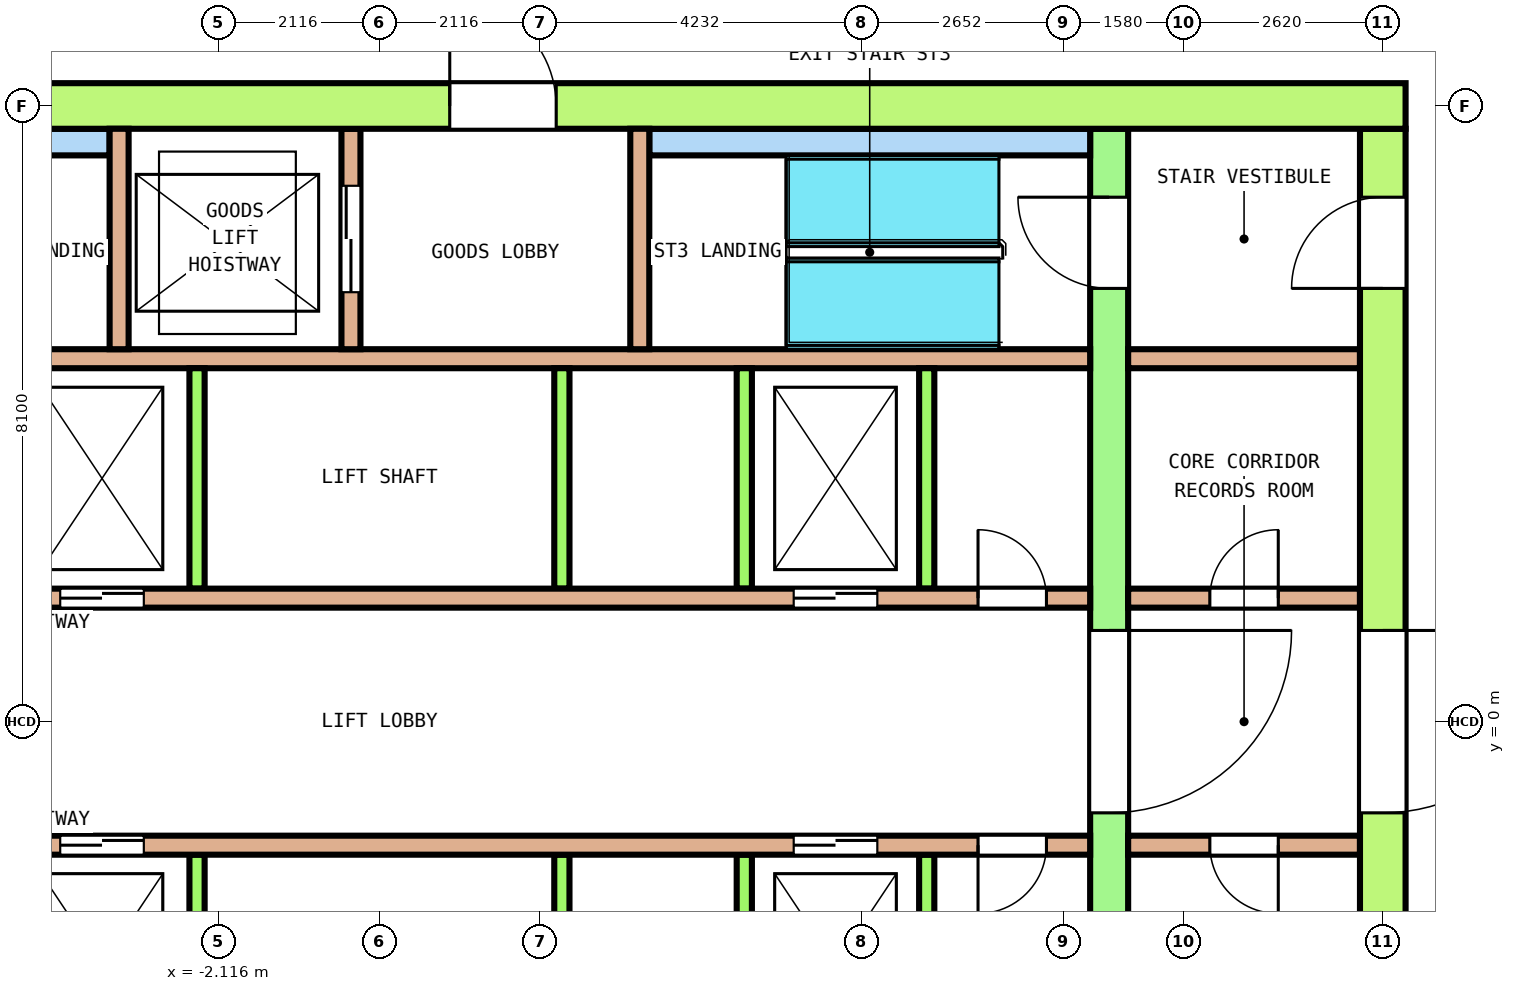
"""IFC4 building model, lengths in metres.
Left out: names, types, materials, properties, quantities, classifications, styles, units other than length and angle.
Written with IfcOpenShell. Run it as: python <this file> out.ifc"""

import sys

from ifc_helpers import new_model, si_unit, direction, frame, frame_2d, origin, place, context, subcontext, project, spatial, rectangle, extrude, element, fill, save


model = new_model("IFC4")
c1 = context("Model", 3, precision=1e-05, world=origin(), true_north=direction((0.0, 1.0)))
c2 = subcontext(c1, "Body", "Model", "MODEL_VIEW")
j1 = project(units=[si_unit("LENGTHUNIT", "METRE"), si_unit("PLANEANGLEUNIT", "RADIAN")], contexts=[c1])
p1 = place(None, origin())
s1 = spatial("IfcSite", under=j1, at=p1, CompositionType="ELEMENT")
p2 = place(p1, origin())
s2 = spatial("IfcBuilding", under=s1, at=p2, CompositionType="ELEMENT")
p3 = place(p2, frame((0.0, 0.0, 223.4)))
s3 = spatial("IfcBuildingStorey", under=s2, at=p3, CompositionType="ELEMENT", Elevation=223.4)
p4 = place(p3, frame((-13.5, 8.1, 0.0), z_axis=(0.0, 0.0, 1.0), x_axis=(1.0, 0.0, 0.0)))
e1 = element("IfcWall", 1, at=p4, inside=s3, PredefinedType="SHEAR", context=c2, shape_type="SweptSolid", body=[
    extrude(rectangle(XDim=27.0, YDim=0.6, at=frame_2d((13.5, 0.0))), origin(), (0.0, 0.0, 1.0), 3.7),
])
p5 = place(p4, frame((14.425, 0.0, 0.0)))
e2 = element("IfcOpeningElement", 2, at=p5, cuts=e1, PredefinedType="OPENING", context=c2, shape_type="SweptSolid", body=[
    extrude(rectangle(XDim=1.4, YDim=2.1, at=frame_2d((0.7, 1.05))), frame((0.0, 0.31, 0.0), z_axis=(0.0, -1.0, 0.0), x_axis=(1.0, 0.0, 0.0)), (0.0, 0.0, 1.0), 0.62),
])
p6 = place(p3, frame((13.2, -7.8, 0.0), z_axis=(0.0, 0.0, 1.0), x_axis=(0.0, 1.0, 0.0)))
e3 = element("IfcWall", 3, at=p6, inside=s3, PredefinedType="SHEAR", context=c2, shape_type="SweptSolid", body=[
    extrude(rectangle(XDim=15.6, YDim=0.6, at=frame_2d((7.8, 0.0))), origin(), (0.0, 0.0, 1.0), 3.7),
])
p7 = place(p6, frame((6.6, 0.0, 0.0)))
e4 = element("IfcOpeningElement", 4, at=p7, cuts=e3, PredefinedType="OPENING", context=c2, shape_type="SweptSolid", body=[
    extrude(rectangle(XDim=2.4, YDim=2.1, at=frame_2d((1.2, 1.05))), frame((0.0, 0.31, 0.0), z_axis=(0.0, -1.0, 0.0), x_axis=(1.0, 0.0, 0.0)), (0.0, 0.0, 1.0), 0.62),
])
p8 = place(p6, frame((13.5, 0.0, 0.0)))
e5 = element("IfcOpeningElement", 5, at=p8, cuts=e3, PredefinedType="OPENING", context=c2, shape_type="SweptSolid", body=[
    extrude(rectangle(XDim=1.2, YDim=2.1, at=frame_2d((0.6, 1.05))), frame((0.0, 0.31, 0.0), z_axis=(0.0, -1.0, 0.0), x_axis=(1.0, 0.0, 0.0)), (0.0, 0.0, 1.0), 0.62),
])
p9 = place(p6, frame((0.194, 0.0, 0.0)))
e6 = element("IfcOpeningElement", 6, at=p9, cuts=e3, PredefinedType="OPENING", context=c2, shape_type="SweptSolid", body=[
    extrude(rectangle(XDim=1.0, YDim=2.1, at=frame_2d((0.5, 1.05))), frame((0.0, 0.31, 0.0), z_axis=(0.0, -1.0, 0.0), x_axis=(1.0, 0.0, 0.0)), (0.0, 0.0, 1.0), 0.62),
])
p10 = place(p6, frame((1.706, 0.0, 0.0)))
e7 = element("IfcOpeningElement", 7, at=p10, cuts=e3, PredefinedType="OPENING", context=c2, shape_type="SweptSolid", body=[
    extrude(rectangle(XDim=1.0, YDim=2.1, at=frame_2d((0.5, 1.05))), frame((0.0, 0.31, 0.0), z_axis=(0.0, -1.0, 0.0), x_axis=(1.0, 0.0, 0.0)), (0.0, 0.0, 1.0), 0.62),
])
p11 = place(p3, frame((9.6, -7.8, 0.0), z_axis=(0.0, 0.0, 1.0), x_axis=(0.0, 1.0, 0.0)))
e8 = element("IfcWall", 8, at=p11, inside=s3, PredefinedType="SHEAR", context=c2, shape_type="SweptSolid", body=[
    extrude(rectangle(XDim=15.6, YDim=0.5, at=frame_2d((7.8, 0.0))), origin(), (0.0, 0.0, 1.0), 3.7),
])
p12 = place(p11, frame((6.6, 0.0, 0.0)))
e9 = element("IfcOpeningElement", 9, at=p12, cuts=e8, PredefinedType="OPENING", context=c2, shape_type="SweptSolid", body=[
    extrude(rectangle(XDim=2.4, YDim=2.1, at=frame_2d((1.2, 1.05))), frame((0.0, 0.26, 0.0), z_axis=(0.0, -1.0, 0.0), x_axis=(1.0, 0.0, 0.0)), (0.0, 0.0, 1.0), 0.52),
])
p13 = place(p11, frame((13.5, 0.0, 0.0)))
e10 = element("IfcOpeningElement", 10, at=p13, cuts=e8, PredefinedType="OPENING", context=c2, shape_type="SweptSolid", body=[
    extrude(rectangle(XDim=1.2, YDim=2.1, at=frame_2d((0.6, 1.05))), frame((0.0, 0.26, 0.0), z_axis=(0.0, -1.0, 0.0), x_axis=(1.0, 0.0, 0.0)), (0.0, 0.0, 1.0), 0.52),
])
p14 = place(p11, frame((1.0, 0.0, 0.0)))
e11 = element("IfcOpeningElement", 11, at=p14, cuts=e8, PredefinedType="OPENING", context=c2, shape_type="SweptSolid", body=[
    extrude(rectangle(XDim=1.0, YDim=2.1, at=frame_2d((0.5, 1.05))), frame((0.0, 0.26, 0.0), z_axis=(0.0, -1.0, 0.0), x_axis=(1.0, 0.0, 0.0)), (0.0, 0.0, 1.0), 0.52),
])
p15 = place(p3, frame((-9.35, 1.625, 0.0), z_axis=(0.0, 0.0, 1.0), x_axis=(1.0, 0.0, 0.0)))
e12 = element("IfcWall", 12, at=p15, inside=s3, PredefinedType="SOLIDWALL", context=c2, shape_type="SweptSolid", body=[
    extrude(rectangle(XDim=18.7, YDim=0.25, at=frame_2d((9.35, 0.0))), origin(), (0.0, 0.0, 1.0), 3.7),
])
p16 = place(p15, frame((2.85, 0.0, 0.0)))
e13 = element("IfcOpeningElement", 13, at=p16, cuts=e12, PredefinedType="OPENING", context=c2, shape_type="SweptSolid", body=[
    extrude(rectangle(XDim=1.1, YDim=2.1, at=frame_2d((0.55, 1.05))), frame((0.0, 0.135, 0.0), z_axis=(0.0, -1.0, 0.0), x_axis=(1.0, 0.0, 0.0)), (0.0, 0.0, 1.0), 0.27),
])
p17 = place(p15, frame((5.15, 0.0, 0.0)))
e14 = element("IfcOpeningElement", 14, at=p17, cuts=e12, PredefinedType="OPENING", context=c2, shape_type="SweptSolid", body=[
    extrude(rectangle(XDim=1.1, YDim=2.1, at=frame_2d((0.55, 1.05))), frame((0.0, 0.135, 0.0), z_axis=(0.0, -1.0, 0.0), x_axis=(1.0, 0.0, 0.0)), (0.0, 0.0, 1.0), 0.27),
])
p18 = place(p15, frame((14.8, 0.0, 0.0)))
e15 = element("IfcOpeningElement", 15, at=p18, cuts=e12, PredefinedType="OPENING", context=c2, shape_type="SweptSolid", body=[
    extrude(rectangle(XDim=1.1, YDim=2.1, at=frame_2d((0.55, 1.05))), frame((0.0, 0.135, 0.0), z_axis=(0.0, -1.0, 0.0), x_axis=(1.0, 0.0, 0.0)), (0.0, 0.0, 1.0), 0.27),
])
p19 = place(p15, frame((0.575, 0.0, 0.0)))
e16 = element("IfcOpeningElement", 16, at=p19, cuts=e12, PredefinedType="OPENING", context=c2, shape_type="SweptSolid", body=[
    extrude(rectangle(XDim=0.9, YDim=2.1, at=frame_2d((0.45, 1.05))), frame((0.0, 0.135, 0.0), z_axis=(0.0, -1.0, 0.0), x_axis=(1.0, 0.0, 0.0)), (0.0, 0.0, 1.0), 0.27),
])
p20 = place(p15, frame((17.225, 0.0, 0.0)))
e17 = element("IfcOpeningElement", 17, at=p20, cuts=e12, PredefinedType="OPENING", context=c2, shape_type="SweptSolid", body=[
    extrude(rectangle(XDim=0.9, YDim=2.1, at=frame_2d((0.45, 1.05))), frame((0.0, 0.135, 0.0), z_axis=(0.0, -1.0, 0.0), x_axis=(1.0, 0.0, 0.0)), (0.0, 0.0, 1.0), 0.27),
])
p21 = place(p3, frame((9.85, 1.625, 0.0), z_axis=(0.0, 0.0, 1.0), x_axis=(1.0, 0.0, 0.0)))
e18 = element("IfcWall", 18, at=p21, inside=s3, PredefinedType="SOLIDWALL", context=c2, shape_type="SweptSolid", body=[
    extrude(rectangle(XDim=3.05, YDim=0.25, at=frame_2d((1.525, 0.0))), origin(), (0.0, 0.0, 1.0), 3.7),
])
p22 = place(p21, frame((1.075, 0.0, 0.0)))
e19 = element("IfcOpeningElement", 19, at=p22, cuts=e18, PredefinedType="OPENING", context=c2, shape_type="SweptSolid", body=[
    extrude(rectangle(XDim=0.9, YDim=2.1, at=frame_2d((0.45, 1.05))), frame((0.0, 0.135, 0.0), z_axis=(0.0, -1.0, 0.0), x_axis=(1.0, 0.0, 0.0)), (0.0, 0.0, 1.0), 0.27),
])
p23 = place(p3, frame((-9.35, 4.775, 0.0), z_axis=(0.0, 0.0, 1.0), x_axis=(1.0, 0.0, 0.0)))
e20 = element("IfcWall", 20, at=p23, inside=s3, PredefinedType="SOLIDWALL", context=c2, shape_type="SweptSolid", body=[
    extrude(rectangle(XDim=18.7, YDim=0.25, at=frame_2d((9.35, 0.0))), origin(), (0.0, 0.0, 1.0), 3.7),
])
p24 = place(p3, frame((9.85, 4.775, 0.0), z_axis=(0.0, 0.0, 1.0), x_axis=(1.0, 0.0, 0.0)))
e21 = element("IfcWall", 21, at=p24, inside=s3, PredefinedType="SOLIDWALL", context=c2, shape_type="SweptSolid", body=[
    extrude(rectangle(XDim=3.05, YDim=0.25, at=frame_2d((1.525, 0.0))), origin(), (0.0, 0.0, 1.0), 3.7),
])
for number, where, z_axis, x_axis in (
    (22, (-2.4, 1.75, 0.0), (0.0, 0.0, 1.0), (0.0, 1.0, 0.0)),
    (23, (2.4, 1.75, 0.0), (0.0, 0.0, 1.0), (0.0, 1.0, 0.0)),
    (24, (4.8, 1.75, 0.0), (0.0, 0.0, 1.0), (0.0, 1.0, 0.0)),
    (25, (7.2, 1.75, 0.0), (0.0, 0.0, 1.0), (0.0, 1.0, 0.0)),
):
    element("IfcWall", number, at=place(p3, frame(where, z_axis=z_axis, x_axis=x_axis)), inside=s3, PredefinedType="SOLIDWALL", context=c2, shape_type="SweptSolid", body=[
        extrude(rectangle(XDim=2.9, YDim=0.2, at=frame_2d((1.45, 0.0))), origin(), (0.0, 0.0, 1.0), 3.7),
    ])
p25 = place(p3, frame((-9.35, -1.625, 0.0), z_axis=(0.0, 0.0, 1.0), x_axis=(1.0, 0.0, 0.0)))
e26 = element("IfcWall", 26, at=p25, inside=s3, PredefinedType="SOLIDWALL", context=c2, shape_type="SweptSolid", body=[
    extrude(rectangle(XDim=18.7, YDim=0.25, at=frame_2d((9.35, 0.0))), origin(), (0.0, 0.0, 1.0), 3.7),
])
p26 = place(p25, frame((2.85, 0.0, 0.0)))
e27 = element("IfcOpeningElement", 27, at=p26, cuts=e26, PredefinedType="OPENING", context=c2, shape_type="SweptSolid", body=[
    extrude(rectangle(XDim=1.1, YDim=2.1, at=frame_2d((0.55, 1.05))), frame((0.0, 0.135, 0.0), z_axis=(0.0, -1.0, 0.0), x_axis=(1.0, 0.0, 0.0)), (0.0, 0.0, 1.0), 0.27),
])
p27 = place(p25, frame((5.15, 0.0, 0.0)))
e28 = element("IfcOpeningElement", 28, at=p27, cuts=e26, PredefinedType="OPENING", context=c2, shape_type="SweptSolid", body=[
    extrude(rectangle(XDim=1.1, YDim=2.1, at=frame_2d((0.55, 1.05))), frame((0.0, 0.135, 0.0), z_axis=(0.0, -1.0, 0.0), x_axis=(1.0, 0.0, 0.0)), (0.0, 0.0, 1.0), 0.27),
])
p28 = place(p25, frame((14.8, 0.0, 0.0)))
e29 = element("IfcOpeningElement", 29, at=p28, cuts=e26, PredefinedType="OPENING", context=c2, shape_type="SweptSolid", body=[
    extrude(rectangle(XDim=1.1, YDim=2.1, at=frame_2d((0.55, 1.05))), frame((0.0, 0.135, 0.0), z_axis=(0.0, -1.0, 0.0), x_axis=(1.0, 0.0, 0.0)), (0.0, 0.0, 1.0), 0.27),
])
p29 = place(p25, frame((0.575, 0.0, 0.0)))
e30 = element("IfcOpeningElement", 30, at=p29, cuts=e26, PredefinedType="OPENING", context=c2, shape_type="SweptSolid", body=[
    extrude(rectangle(XDim=0.9, YDim=2.1, at=frame_2d((0.45, 1.05))), frame((0.0, 0.135, 0.0), z_axis=(0.0, -1.0, 0.0), x_axis=(1.0, 0.0, 0.0)), (0.0, 0.0, 1.0), 0.27),
])
p30 = place(p25, frame((17.225, 0.0, 0.0)))
e31 = element("IfcOpeningElement", 31, at=p30, cuts=e26, PredefinedType="OPENING", context=c2, shape_type="SweptSolid", body=[
    extrude(rectangle(XDim=0.9, YDim=2.1, at=frame_2d((0.45, 1.05))), frame((0.0, 0.135, 0.0), z_axis=(0.0, -1.0, 0.0), x_axis=(1.0, 0.0, 0.0)), (0.0, 0.0, 1.0), 0.27),
])
p31 = place(p3, frame((9.85, -1.625, 0.0), z_axis=(0.0, 0.0, 1.0), x_axis=(1.0, 0.0, 0.0)))
e32 = element("IfcWall", 32, at=p31, inside=s3, PredefinedType="SOLIDWALL", context=c2, shape_type="SweptSolid", body=[
    extrude(rectangle(XDim=3.05, YDim=0.25, at=frame_2d((1.525, 0.0))), origin(), (0.0, 0.0, 1.0), 3.7),
])
p32 = place(p31, frame((1.075, 0.0, 0.0)))
e33 = element("IfcOpeningElement", 33, at=p32, cuts=e32, PredefinedType="OPENING", context=c2, shape_type="SweptSolid", body=[
    extrude(rectangle(XDim=0.9, YDim=2.1, at=frame_2d((0.45, 1.05))), frame((0.0, 0.135, 0.0), z_axis=(0.0, -1.0, 0.0), x_axis=(1.0, 0.0, 0.0)), (0.0, 0.0, 1.0), 0.27),
])
for number, where, z_axis, x_axis in (
    (34, (-2.4, -4.65, 0.0), (0.0, 0.0, 1.0), (0.0, 1.0, 0.0)),
    (35, (2.4, -4.65, 0.0), (0.0, 0.0, 1.0), (0.0, 1.0, 0.0)),
    (36, (4.8, -4.65, 0.0), (0.0, 0.0, 1.0), (0.0, 1.0, 0.0)),
    (37, (7.2, -4.65, 0.0), (0.0, 0.0, 1.0), (0.0, 1.0, 0.0)),
):
    element("IfcWall", number, at=place(p3, frame(where, z_axis=z_axis, x_axis=x_axis)), inside=s3, PredefinedType="SOLIDWALL", context=c2, shape_type="SweptSolid", body=[
        extrude(rectangle(XDim=2.9, YDim=0.2, at=frame_2d((1.45, 0.0))), origin(), (0.0, 0.0, 1.0), 3.7),
    ])
for number, where, z_axis, x_axis in (
    (38, (-9.35, 7.625, 0.0), (0.0, 0.0, 1.0), (1.0, 0.0, 0.0)),
    (39, (3.55, 7.625, 0.0), (0.0, 0.0, 1.0), (1.0, 0.0, 0.0)),
):
    element("IfcWall", number, at=place(p3, frame(where, z_axis=z_axis, x_axis=x_axis)), inside=s3, PredefinedType="SOLIDWALL", context=c2, shape_type="SweptSolid", body=[
        extrude(rectangle(XDim=5.8, YDim=0.35, at=frame_2d((2.9, 0.0))), origin(), (0.0, 0.0, 1.0), 3.7),
    ])
p33 = place(p3, frame((-3.425, 4.9, 0.0), z_axis=(0.0, 0.0, 1.0), x_axis=(0.0, 1.0, 0.0)))
e40 = element("IfcWall", 40, at=p33, inside=s3, PredefinedType="SOLIDWALL", context=c2, shape_type="SweptSolid", body=[
    extrude(rectangle(XDim=2.9, YDim=0.25, at=frame_2d((1.45, 0.0))), origin(), (0.0, 0.0, 1.0), 3.7),
])
p34 = place(p3, frame((-0.375, 4.9, 0.0), z_axis=(0.0, 0.0, 1.0), x_axis=(0.0, 1.0, 0.0)))
e41 = element("IfcWall", 41, at=p34, inside=s3, PredefinedType="SOLIDWALL", context=c2, shape_type="SweptSolid", body=[
    extrude(rectangle(XDim=2.9, YDim=0.25, at=frame_2d((1.45, 0.0))), origin(), (0.0, 0.0, 1.0), 3.7),
])
p35 = place(p34, frame((0.75, 0.0, 0.0)))
e42 = element("IfcOpeningElement", 42, at=p35, cuts=e41, PredefinedType="OPENING", context=c2, shape_type="SweptSolid", body=[
    extrude(rectangle(XDim=1.4, YDim=2.1, at=frame_2d((0.7, 1.05))), frame((0.0, 0.135, 0.0), z_axis=(0.0, -1.0, 0.0), x_axis=(1.0, 0.0, 0.0)), (0.0, 0.0, 1.0), 0.27),
])
p36 = place(p3, frame((3.425, 4.9, 0.0), z_axis=(0.0, 0.0, 1.0), x_axis=(0.0, 1.0, 0.0)))
e43 = element("IfcWall", 43, at=p36, inside=s3, PredefinedType="SOLIDWALL", context=c2, shape_type="SweptSolid", body=[
    extrude(rectangle(XDim=2.9, YDim=0.25, at=frame_2d((1.45, 0.0))), origin(), (0.0, 0.0, 1.0), 3.7),
])
p37 = place(p17, origin())
e44 = element("IfcDoor", 44, at=p37, inside=s3, OperationType="DOUBLE_DOOR_SLIDING", PredefinedType="DOOR", context=c2, shape_type="SweptSolid", body=[
    extrude(rectangle(XDim=1.1, YDim=2.1, at=frame_2d((0.55, 1.05))), frame((0.0, 0.075, 0.0), z_axis=(0.0, -1.0, 0.0), x_axis=(1.0, 0.0, 0.0)), (0.0, 0.0, 1.0), 0.15),
])
fill(e14, e44)
p38 = place(p18, origin())
e45 = element("IfcDoor", 45, at=p38, inside=s3, OperationType="DOUBLE_DOOR_SLIDING", PredefinedType="DOOR", context=c2, shape_type="SweptSolid", body=[
    extrude(rectangle(XDim=1.1, YDim=2.1, at=frame_2d((0.55, 1.05))), frame((0.0, 0.075, 0.0), z_axis=(0.0, -1.0, 0.0), x_axis=(1.0, 0.0, 0.0)), (0.0, 0.0, 1.0), 0.15),
])
fill(e15, e45)
p39 = place(p27, origin())
e46 = element("IfcDoor", 46, at=p39, inside=s3, OperationType="DOUBLE_DOOR_SLIDING", PredefinedType="DOOR", context=c2, shape_type="SweptSolid", body=[
    extrude(rectangle(XDim=1.1, YDim=2.1, at=frame_2d((0.55, 1.05))), frame((0.0, 0.075, 0.0), z_axis=(0.0, -1.0, 0.0), x_axis=(1.0, 0.0, 0.0)), (0.0, 0.0, 1.0), 0.15),
])
fill(e28, e46)
p40 = place(p28, origin())
e47 = element("IfcDoor", 47, at=p40, inside=s3, OperationType="DOUBLE_DOOR_SLIDING", PredefinedType="DOOR", context=c2, shape_type="SweptSolid", body=[
    extrude(rectangle(XDim=1.1, YDim=2.1, at=frame_2d((0.55, 1.05))), frame((0.0, 0.075, 0.0), z_axis=(0.0, -1.0, 0.0), x_axis=(1.0, 0.0, 0.0)), (0.0, 0.0, 1.0), 0.15),
])
fill(e29, e47)
p41 = place(p35, origin())
e48 = element("IfcDoor", 48, at=p41, inside=s3, OperationType="DOUBLE_DOOR_SLIDING", PredefinedType="DOOR", context=c2, shape_type="SweptSolid", body=[
    extrude(rectangle(XDim=1.4, YDim=2.1, at=frame_2d((0.7, 1.05))), frame((0.0, 0.075, 0.0), z_axis=(0.0, -1.0, 0.0), x_axis=(1.0, 0.0, 0.0)), (0.0, 0.0, 1.0), 0.15),
])
fill(e42, e48)
p42 = place(p12, origin())
e49 = element("IfcDoor", 49, at=p42, inside=s3, OperationType="DOUBLE_DOOR_SINGLE_SWING", PredefinedType="DOOR", context=c2, shape_type="SweptSolid", body=[
    extrude(rectangle(XDim=2.4, YDim=2.1, at=frame_2d((1.2, 1.05))), frame((0.0, 0.2, 0.0), z_axis=(0.0, -1.0, 0.0), x_axis=(1.0, 0.0, 0.0)), (0.0, 0.0, 1.0), 0.4),
])
fill(e9, e49)
p43 = place(p7, origin())
e50 = element("IfcDoor", 50, at=p43, inside=s3, OperationType="DOUBLE_DOOR_SINGLE_SWING", PredefinedType="DOOR", context=c2, shape_type="SweptSolid", body=[
    extrude(rectangle(XDim=2.4, YDim=2.1, at=frame_2d((1.2, 1.05))), frame((0.0, 0.25, 0.0), z_axis=(0.0, -1.0, 0.0), x_axis=(1.0, 0.0, 0.0)), (0.0, 0.0, 1.0), 0.5),
])
fill(e4, e50)
p44 = place(p13, origin())
e51 = element("IfcDoor", 51, at=p44, inside=s3, OperationType="SINGLE_SWING_RIGHT", PredefinedType="DOOR", context=c2, shape_type="SweptSolid", body=[
    extrude(rectangle(XDim=1.2, YDim=2.1, at=frame_2d((0.6, 1.05))), frame((0.0, 0.2, 0.0), z_axis=(0.0, -1.0, 0.0), x_axis=(1.0, 0.0, 0.0)), (0.0, 0.0, 1.0), 0.4),
])
fill(e10, e51)
p45 = place(p8, origin())
e52 = element("IfcDoor", 52, at=p45, inside=s3, OperationType="SINGLE_SWING_LEFT", PredefinedType="DOOR", context=c2, shape_type="SweptSolid", body=[
    extrude(rectangle(XDim=1.2, YDim=2.1, at=frame_2d((0.6, 1.05))), frame((0.0, 0.25, 0.0), z_axis=(0.0, -1.0, 0.0), x_axis=(1.0, 0.0, 0.0)), (0.0, 0.0, 1.0), 0.5),
])
fill(e5, e52)
p46 = place(p5, origin())
e53 = element("IfcDoor", 53, at=p46, inside=s3, OperationType="DOUBLE_DOOR_SINGLE_SWING", PredefinedType="DOOR", context=c2, shape_type="SweptSolid", body=[
    extrude(rectangle(XDim=1.4, YDim=2.1, at=frame_2d((0.7, 1.05))), frame((0.0, 0.25, 0.0), z_axis=(0.0, -1.0, 0.0), x_axis=(1.0, 0.0, 0.0)), (0.0, 0.0, 1.0), 0.5),
])
fill(e2, e53)
p47 = place(p20, origin())
e54 = element("IfcDoor", 54, at=p47, inside=s3, OperationType="SINGLE_SWING_RIGHT", PredefinedType="DOOR", context=c2, shape_type="SweptSolid", body=[
    extrude(rectangle(XDim=0.9, YDim=2.1, at=frame_2d((0.45, 1.05))), frame((0.0, 0.075, 0.0), z_axis=(0.0, -1.0, 0.0), x_axis=(1.0, 0.0, 0.0)), (0.0, 0.0, 1.0), 0.15),
])
fill(e17, e54)
p48 = place(p22, origin())
e55 = element("IfcDoor", 55, at=p48, inside=s3, OperationType="SINGLE_SWING_LEFT", PredefinedType="DOOR", context=c2, shape_type="SweptSolid", body=[
    extrude(rectangle(XDim=0.9, YDim=2.1, at=frame_2d((0.45, 1.05))), frame((0.0, 0.075, 0.0), z_axis=(0.0, -1.0, 0.0), x_axis=(1.0, 0.0, 0.0)), (0.0, 0.0, 1.0), 0.15),
])
fill(e19, e55)
p49 = place(p30, origin())
e56 = element("IfcDoor", 56, at=p49, inside=s3, OperationType="SINGLE_SWING_LEFT", PredefinedType="DOOR", context=c2, shape_type="SweptSolid", body=[
    extrude(rectangle(XDim=0.9, YDim=2.1, at=frame_2d((0.45, 1.05))), frame((0.0, 0.075, 0.0), z_axis=(0.0, -1.0, 0.0), x_axis=(1.0, 0.0, 0.0)), (0.0, 0.0, 1.0), 0.15),
])
fill(e31, e56)
p50 = place(p32, origin())
e57 = element("IfcDoor", 57, at=p50, inside=s3, OperationType="SINGLE_SWING_RIGHT", PredefinedType="DOOR", context=c2, shape_type="SweptSolid", body=[
    extrude(rectangle(XDim=0.9, YDim=2.1, at=frame_2d((0.45, 1.05))), frame((0.0, 0.075, 0.0), z_axis=(0.0, -1.0, 0.0), x_axis=(1.0, 0.0, 0.0)), (0.0, 0.0, 1.0), 0.15),
])
fill(e33, e57)
save(model, sys.argv[1])
